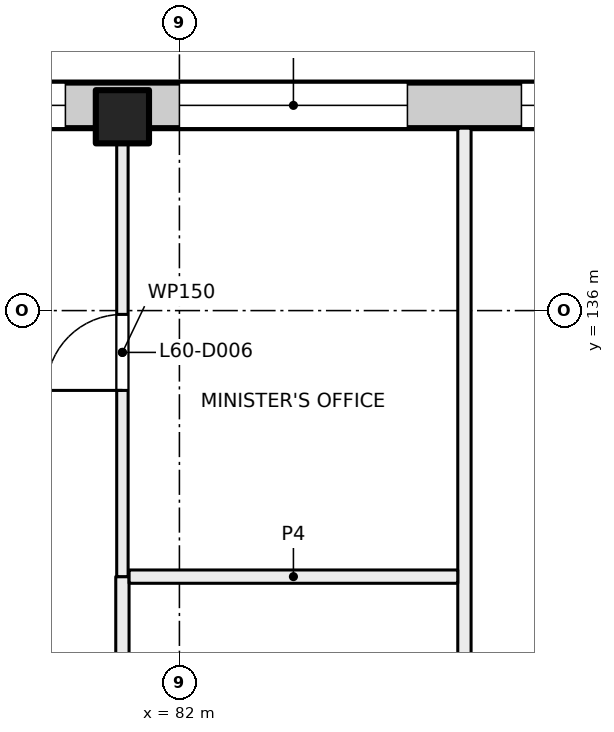
"""IFC4 building model, lengths in metres.
Left out: names, types, materials, properties, quantities, classifications, styles, units other than length and angle.
Written with IfcOpenShell. Run it as: python <this file> out.ifc"""

import sys

from ifc_helpers import new_model, si_unit, direction, frame, frame_2d, origin, origin_2d, place, context, subcontext, project, spatial, rectangle, extrude, element, fill, save


model = new_model("IFC4")
c1 = context("Model", 3, precision=1e-05, world=origin(), true_north=direction((0.0, 1.0)))
c2 = subcontext(c1, "Body", "Model", "MODEL_VIEW")
j1 = project(units=[si_unit("LENGTHUNIT", "METRE"), si_unit("PLANEANGLEUNIT", "RADIAN")], contexts=[c1])
p1 = place(None, origin())
s1 = spatial("IfcSite", under=j1, at=p1, CompositionType="ELEMENT")
p2 = place(p1, origin())
s2 = spatial("IfcBuilding", under=s1, at=p2, CompositionType="ELEMENT")
p3 = place(p2, frame((0.0, 0.0, 253.5)))
s3 = spatial("IfcBuildingStorey", under=s2, at=p3, CompositionType="ELEMENT", Elevation=253.5)
p4 = place(p3, frame((81.25, 138.55, 0.0), z_axis=(0.0, 0.0, 1.0), x_axis=(1.0, 0.0, 0.0)))
e1 = element("IfcColumn", 1, at=p4, inside=s3, PredefinedType="COLUMN", context=c2, shape_type="SweptSolid", body=[
    extrude(rectangle(XDim=0.7, YDim=0.7, at=origin_2d()), origin(), (0.0, 0.0, 1.0), 4.0),
])
p5 = place(p3, frame((47.07, 138.7, 0.0), z_axis=(0.0, 0.0, 1.0), x_axis=(1.0, 0.0, 0.0)))
e2 = element("IfcWall", 2, at=p5, inside=s3, PredefinedType="SOLIDWALL", context=c2, shape_type="SweptSolid", body=[
    extrude(rectangle(XDim=43.91, YDim=0.6, at=frame_2d((21.955, 0.0))), origin(), (0.0, 0.0, 1.0), 3.625),
])
p6 = place(p5, frame((3.43, 0.0, 0.9)))
e3 = element("IfcOpeningElement", 3, at=p6, cuts=e2, PredefinedType="OPENING", context=c2, shape_type="SweptSolid", body=[
    extrude(rectangle(XDim=3.0, YDim=2.4, at=frame_2d((1.5, 1.2))), frame((0.0, 0.31, 0.0), z_axis=(0.0, -1.0, 0.0), x_axis=(1.0, 0.0, 0.0)), (0.0, 0.0, 1.0), 0.62),
])
p7 = place(p5, frame((8.53, 0.0, 0.0)))
e4 = element("IfcOpeningElement", 4, at=p7, cuts=e2, PredefinedType="OPENING", context=c2, shape_type="SweptSolid", body=[
    extrude(rectangle(XDim=1.8, YDim=2.4, at=frame_2d((0.9, 1.2))), frame((0.0, 0.31, 0.0), z_axis=(0.0, -1.0, 0.0), x_axis=(1.0, 0.0, 0.0)), (0.0, 0.0, 1.0), 0.62),
])
p8 = place(p5, frame((12.43, 0.0, 0.9)))
e5 = element("IfcOpeningElement", 5, at=p8, cuts=e2, PredefinedType="OPENING", context=c2, shape_type="SweptSolid", body=[
    extrude(rectangle(XDim=3.0, YDim=2.4, at=frame_2d((1.5, 1.2))), frame((0.0, 0.31, 0.0), z_axis=(0.0, -1.0, 0.0), x_axis=(1.0, 0.0, 0.0)), (0.0, 0.0, 1.0), 0.62),
])
p9 = place(p5, frame((16.93, 0.0, 0.9)))
e6 = element("IfcOpeningElement", 6, at=p9, cuts=e2, PredefinedType="OPENING", context=c2, shape_type="SweptSolid", body=[
    extrude(rectangle(XDim=3.0, YDim=2.4, at=frame_2d((1.5, 1.2))), frame((0.0, 0.31, 0.0), z_axis=(0.0, -1.0, 0.0), x_axis=(1.0, 0.0, 0.0)), (0.0, 0.0, 1.0), 0.62),
])
p10 = place(p5, frame((22.03, 0.0, 0.0)))
e7 = element("IfcOpeningElement", 7, at=p10, cuts=e2, PredefinedType="OPENING", context=c2, shape_type="SweptSolid", body=[
    extrude(rectangle(XDim=1.8, YDim=2.4, at=frame_2d((0.9, 1.2))), frame((0.0, 0.31, 0.0), z_axis=(0.0, -1.0, 0.0), x_axis=(1.0, 0.0, 0.0)), (0.0, 0.0, 1.0), 0.62),
])
p11 = place(p5, frame((25.93, 0.0, 0.9)))
e8 = element("IfcOpeningElement", 8, at=p11, cuts=e2, PredefinedType="OPENING", context=c2, shape_type="SweptSolid", body=[
    extrude(rectangle(XDim=3.0, YDim=2.4, at=frame_2d((1.5, 1.2))), frame((0.0, 0.31, 0.0), z_axis=(0.0, -1.0, 0.0), x_axis=(1.0, 0.0, 0.0)), (0.0, 0.0, 1.0), 0.62),
])
p12 = place(p5, frame((30.43, 0.0, 0.9)))
e9 = element("IfcOpeningElement", 9, at=p12, cuts=e2, PredefinedType="OPENING", context=c2, shape_type="SweptSolid", body=[
    extrude(rectangle(XDim=3.0, YDim=2.4, at=frame_2d((1.5, 1.2))), frame((0.0, 0.31, 0.0), z_axis=(0.0, -1.0, 0.0), x_axis=(1.0, 0.0, 0.0)), (0.0, 0.0, 1.0), 0.62),
])
p13 = place(p5, frame((34.93, 0.0, 0.9)))
e10 = element("IfcOpeningElement", 10, at=p13, cuts=e2, PredefinedType="OPENING", context=c2, shape_type="SweptSolid", body=[
    extrude(rectangle(XDim=3.0, YDim=2.4, at=frame_2d((1.5, 1.2))), frame((0.0, 0.31, 0.0), z_axis=(0.0, -1.0, 0.0), x_axis=(1.0, 0.0, 0.0)), (0.0, 0.0, 1.0), 0.62),
])
p14 = place(p5, frame((39.43, 0.0, 0.9)))
e11 = element("IfcOpeningElement", 11, at=p14, cuts=e2, PredefinedType="OPENING", context=c2, shape_type="SweptSolid", body=[
    extrude(rectangle(XDim=3.0, YDim=2.4, at=frame_2d((1.5, 1.2))), frame((0.0, 0.31, 0.0), z_axis=(0.0, -1.0, 0.0), x_axis=(1.0, 0.0, 0.0)), (0.0, 0.0, 1.0), 0.62),
])
p15 = place(p3, frame((81.25, 132.5, 0.0), z_axis=(0.0, 0.0, 1.0), x_axis=(0.0, -1.0, 0.0)))
e12 = element("IfcWall", 12, at=p15, inside=s3, PredefinedType="PARTITIONING", context=c2, shape_type="SweptSolid", body=[
    extrude(rectangle(XDim=11.0, YDim=0.175, at=frame_2d((5.5, 0.0))), origin(), (0.0, 0.0, 1.0), 3.625),
])
p16 = place(p15, frame((3.652, 0.0, 0.0)))
e13 = element("IfcOpeningElement", 13, at=p16, cuts=e12, PredefinedType="OPENING", context=c2, shape_type="SweptSolid", body=[
    extrude(rectangle(XDim=1.2, YDim=2.1, at=frame_2d((0.6, 1.05))), frame((0.0, 0.097, 0.0), z_axis=(0.0, -1.0, 0.0), x_axis=(1.0, 0.0, 0.0)), (0.0, 0.0, 1.0), 0.195),
])
p17 = place(p3, frame((81.25, 132.5, 0.0), z_axis=(0.0, 0.0, 1.0), x_axis=(0.0, 1.0, 0.0)))
e14 = element("IfcWall", 14, at=p17, inside=s3, PredefinedType="PARTITIONING", context=c2, shape_type="SweptSolid", body=[
    extrude(rectangle(XDim=5.9, YDim=0.15, at=frame_2d((2.95, 0.0))), origin(), (0.0, 0.0, 1.0), 3.625),
])
p18 = place(p17, frame((2.45, 0.0, 0.0)))
e15 = element("IfcOpeningElement", 15, at=p18, cuts=e14, PredefinedType="OPENING", context=c2, shape_type="SweptSolid", body=[
    extrude(rectangle(XDim=1.0, YDim=2.1, at=frame_2d((0.5, 1.05))), frame((0.0, 0.085, 0.0), z_axis=(0.0, -1.0, 0.0), x_axis=(1.0, 0.0, 0.0)), (0.0, 0.0, 1.0), 0.17),
])
p19 = place(p3, frame((85.75, 121.35, 0.0), z_axis=(0.0, 0.0, 1.0), x_axis=(0.0, 1.0, 0.0)))
e16 = element("IfcWall", 16, at=p19, inside=s3, PredefinedType="PARTITIONING", context=c2, shape_type="SweptSolid", body=[
    extrude(rectangle(XDim=17.05, YDim=0.175, at=frame_2d((8.525, 0.0))), origin(), (0.0, 0.0, 1.0), 3.625),
])
p20 = place(p3, frame((85.662, 132.5, 0.0), z_axis=(0.0, 0.0, 1.0), x_axis=(-1.0, 0.0, 0.0)))
e17 = element("IfcWall", 17, at=p20, inside=s3, PredefinedType="PARTITIONING", context=c2, shape_type="SweptSolid", body=[
    extrude(rectangle(XDim=4.324, YDim=0.175, at=frame_2d((2.162, 0.0))), origin(), (0.0, 0.0, 1.0), 3.625),
])
p21 = place(p12, origin())
e18 = element("IfcWindow", 18, at=p21, inside=s3, PartitioningType="SINGLE_PANEL", PredefinedType="WINDOW", context=c2, shape_type="SweptSolid", body=[
    extrude(rectangle(XDim=3.0, YDim=2.4, at=frame_2d((1.5, 1.2))), frame((0.0, 0.03, 0.0), z_axis=(0.0, -1.0, 0.0), x_axis=(1.0, 0.0, 0.0)), (0.0, 0.0, 1.0), 0.06),
])
fill(e9, e18)
p22 = place(p13, origin())
e19 = element("IfcWindow", 19, at=p22, inside=s3, PartitioningType="SINGLE_PANEL", PredefinedType="WINDOW", context=c2, shape_type="SweptSolid", body=[
    extrude(rectangle(XDim=3.0, YDim=2.4, at=frame_2d((1.5, 1.2))), frame((0.0, 0.03, 0.0), z_axis=(0.0, -1.0, 0.0), x_axis=(1.0, 0.0, 0.0)), (0.0, 0.0, 1.0), 0.06),
])
fill(e10, e19)
p23 = place(p14, origin())
e20 = element("IfcWindow", 20, at=p23, inside=s3, PartitioningType="SINGLE_PANEL", PredefinedType="WINDOW", context=c2, shape_type="SweptSolid", body=[
    extrude(rectangle(XDim=3.0, YDim=2.4, at=frame_2d((1.5, 1.2))), frame((0.0, 0.03, 0.0), z_axis=(0.0, -1.0, 0.0), x_axis=(1.0, 0.0, 0.0)), (0.0, 0.0, 1.0), 0.06),
])
fill(e11, e20)
p24 = place(p18, origin())
e21 = element("IfcDoor", 21, at=p24, inside=s3, OperationType="SINGLE_SWING_LEFT", PredefinedType="DOOR", context=c2, shape_type="SweptSolid", body=[
    extrude(rectangle(XDim=1.0, YDim=2.1, at=frame_2d((0.5, 1.05))), frame((0.0, 0.025, 0.0), z_axis=(0.0, -1.0, 0.0), x_axis=(1.0, 0.0, 0.0)), (0.0, 0.0, 1.0), 0.05),
])
fill(e15, e21)
save(model, sys.argv[1])
